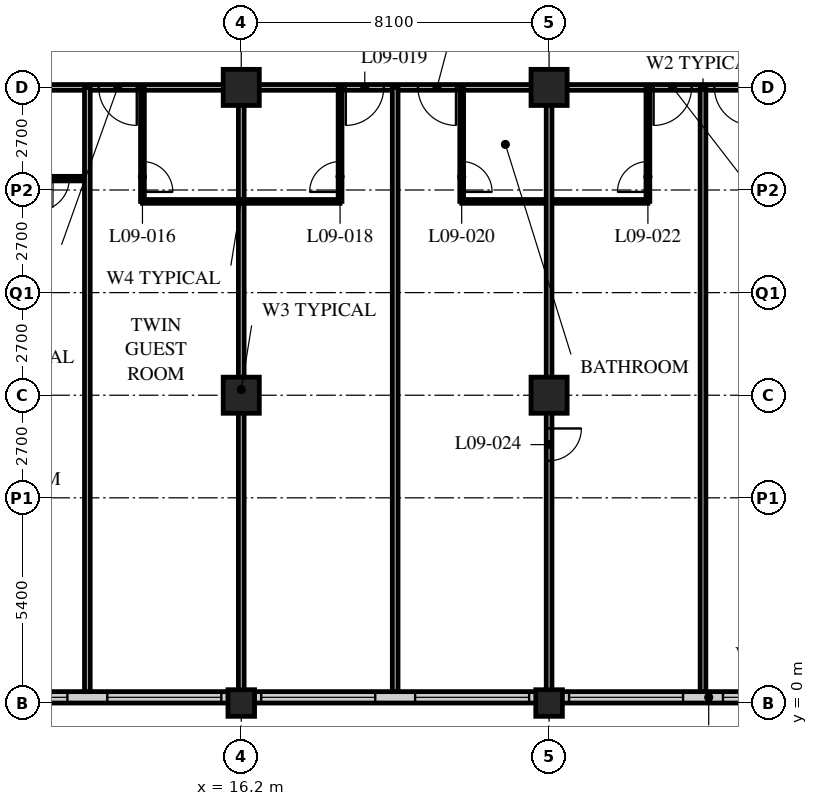
"""IFC4 building model, lengths in metres.
Left out: names, types, materials, properties, quantities, classifications, styles, units other than length and angle.
Written with IfcOpenShell. Run it as: python <this file> out.ifc"""

import sys

from ifc_helpers import new_model, si_unit, direction, frame, frame_2d, origin, origin_2d, place, context, subcontext, project, spatial, rectangle, hollow_rectangle, extrude, element, fill, save


model = new_model("IFC4")
c1 = context("Model", 3, precision=1e-05, world=origin(), true_north=direction((0.0, 1.0)))
c2 = subcontext(c1, "Body", "Model", "MODEL_VIEW")
j1 = project(units=[si_unit("LENGTHUNIT", "METRE"), si_unit("PLANEANGLEUNIT", "RADIAN")], contexts=[c1])
p1 = place(None, origin())
s1 = spatial("IfcSite", under=j1, at=p1, CompositionType="ELEMENT")
p2 = place(p1, origin())
s2 = spatial("IfcBuilding", under=s1, at=p2, CompositionType="ELEMENT")
p3 = place(p2, frame((0.0, 0.0, 43.2)))
s3 = spatial("IfcBuildingStorey", under=s2, at=p3, CompositionType="ELEMENT", Elevation=43.2)
p4 = place(p3, frame((16.2, 0.0, 0.0), z_axis=(0.0, 0.0, 1.0), x_axis=(1.0, 0.0, 0.0)))
e1 = element("IfcColumn", 1, at=p4, inside=s3, PredefinedType="COLUMN", context=c2, shape_type="SweptSolid", body=[
    extrude(hollow_rectangle(XDim=0.7, YDim=0.7, WallThickness=0.06, at=origin_2d()), origin(), (0.0, 0.0, 1.0), 3.4),
])
for number, where, z_axis, x_axis in (
    (2, (16.2, 8.1, 0.0), (0.0, 0.0, 1.0), (1.0, 0.0, 0.0)),
    (3, (16.2, 16.2, 0.0), (0.0, 0.0, 1.0), (1.0, 0.0, 0.0)),
):
    element("IfcColumn", number, at=place(p3, frame(where, z_axis=z_axis, x_axis=x_axis)), inside=s3, PredefinedType="COLUMN", context=c2, shape_type="SweptSolid", body=[
        extrude(hollow_rectangle(XDim=0.95, YDim=0.95, WallThickness=0.095, at=origin_2d()), origin(), (0.0, 0.0, 1.0), 3.4),
    ])
p5 = place(p3, frame((24.3, 0.0, 0.0), z_axis=(0.0, 0.0, 1.0), x_axis=(1.0, 0.0, 0.0)))
e4 = element("IfcColumn", 4, at=p5, inside=s3, PredefinedType="COLUMN", context=c2, shape_type="SweptSolid", body=[
    extrude(hollow_rectangle(XDim=0.7, YDim=0.7, WallThickness=0.06, at=origin_2d()), origin(), (0.0, 0.0, 1.0), 3.4),
])
for number, where, z_axis, x_axis in (
    (5, (24.3, 8.1, 0.0), (0.0, 0.0, 1.0), (1.0, 0.0, 0.0)),
    (6, (24.3, 16.2, 0.0), (0.0, 0.0, 1.0), (1.0, 0.0, 0.0)),
):
    element("IfcColumn", number, at=place(p3, frame(where, z_axis=z_axis, x_axis=x_axis)), inside=s3, PredefinedType="COLUMN", context=c2, shape_type="SweptSolid", body=[
        extrude(hollow_rectangle(XDim=0.95, YDim=0.95, WallThickness=0.095, at=origin_2d()), origin(), (0.0, 0.0, 1.0), 3.4),
    ])
p6 = place(p3, frame((8.4, 0.15, 0.0), z_axis=(0.0, 0.0, 1.0), x_axis=(1.0, 0.0, 0.0)))
e7 = element("IfcWall", 7, at=p6, inside=s3, PredefinedType="SOLIDWALL", context=c2, shape_type="SweptSolid", body=[
    extrude(rectangle(XDim=40.2, YDim=0.3, at=frame_2d((20.1, 0.0))), origin(), (0.0, 0.0, 1.0), 3.19),
])
p7 = place(p6, frame((0.225, 0.0, 0.9)))
e8 = element("IfcOpeningElement", 8, at=p7, cuts=e7, PredefinedType="OPENING", context=c2, shape_type="SweptSolid", body=[
    extrude(rectangle(XDim=3.0, YDim=2.0, at=frame_2d((1.5, 1.0))), frame((0.0, 0.16, 0.0), z_axis=(0.0, -1.0, 0.0), x_axis=(1.0, 0.0, 0.0)), (0.0, 0.0, 1.0), 0.32),
])
p8 = place(p6, frame((4.275, 0.0, 0.9)))
e9 = element("IfcOpeningElement", 9, at=p8, cuts=e7, PredefinedType="OPENING", context=c2, shape_type="SweptSolid", body=[
    extrude(rectangle(XDim=3.0, YDim=2.0, at=frame_2d((1.5, 1.0))), frame((0.0, 0.16, 0.0), z_axis=(0.0, -1.0, 0.0), x_axis=(1.0, 0.0, 0.0)), (0.0, 0.0, 1.0), 0.32),
])
p9 = place(p6, frame((8.325, 0.0, 0.9)))
e10 = element("IfcOpeningElement", 10, at=p9, cuts=e7, PredefinedType="OPENING", context=c2, shape_type="SweptSolid", body=[
    extrude(rectangle(XDim=3.0, YDim=2.0, at=frame_2d((1.5, 1.0))), frame((0.0, 0.16, 0.0), z_axis=(0.0, -1.0, 0.0), x_axis=(1.0, 0.0, 0.0)), (0.0, 0.0, 1.0), 0.32),
])
p10 = place(p6, frame((12.375, 0.0, 0.9)))
e11 = element("IfcOpeningElement", 11, at=p10, cuts=e7, PredefinedType="OPENING", context=c2, shape_type="SweptSolid", body=[
    extrude(rectangle(XDim=3.0, YDim=2.0, at=frame_2d((1.5, 1.0))), frame((0.0, 0.16, 0.0), z_axis=(0.0, -1.0, 0.0), x_axis=(1.0, 0.0, 0.0)), (0.0, 0.0, 1.0), 0.32),
])
p11 = place(p6, frame((16.425, 0.0, 0.9)))
e12 = element("IfcOpeningElement", 12, at=p11, cuts=e7, PredefinedType="OPENING", context=c2, shape_type="SweptSolid", body=[
    extrude(rectangle(XDim=3.0, YDim=2.0, at=frame_2d((1.5, 1.0))), frame((0.0, 0.16, 0.0), z_axis=(0.0, -1.0, 0.0), x_axis=(1.0, 0.0, 0.0)), (0.0, 0.0, 1.0), 0.32),
])
p12 = place(p6, frame((20.475, 0.0, 0.9)))
e13 = element("IfcOpeningElement", 13, at=p12, cuts=e7, PredefinedType="OPENING", context=c2, shape_type="SweptSolid", body=[
    extrude(rectangle(XDim=3.0, YDim=2.0, at=frame_2d((1.5, 1.0))), frame((0.0, 0.16, 0.0), z_axis=(0.0, -1.0, 0.0), x_axis=(1.0, 0.0, 0.0)), (0.0, 0.0, 1.0), 0.32),
])
p13 = place(p6, frame((24.525, 0.0, 0.9)))
e14 = element("IfcOpeningElement", 14, at=p13, cuts=e7, PredefinedType="OPENING", context=c2, shape_type="SweptSolid", body=[
    extrude(rectangle(XDim=3.0, YDim=2.0, at=frame_2d((1.5, 1.0))), frame((0.0, 0.16, 0.0), z_axis=(0.0, -1.0, 0.0), x_axis=(1.0, 0.0, 0.0)), (0.0, 0.0, 1.0), 0.32),
])
p14 = place(p6, frame((28.575, 0.0, 0.9)))
e15 = element("IfcOpeningElement", 15, at=p14, cuts=e7, PredefinedType="OPENING", context=c2, shape_type="SweptSolid", body=[
    extrude(rectangle(XDim=3.0, YDim=2.0, at=frame_2d((1.5, 1.0))), frame((0.0, 0.16, 0.0), z_axis=(0.0, -1.0, 0.0), x_axis=(1.0, 0.0, 0.0)), (0.0, 0.0, 1.0), 0.32),
])
p15 = place(p6, frame((32.625, 0.0, 0.9)))
e16 = element("IfcOpeningElement", 16, at=p15, cuts=e7, PredefinedType="OPENING", context=c2, shape_type="SweptSolid", body=[
    extrude(rectangle(XDim=3.0, YDim=2.0, at=frame_2d((1.5, 1.0))), frame((0.0, 0.16, 0.0), z_axis=(0.0, -1.0, 0.0), x_axis=(1.0, 0.0, 0.0)), (0.0, 0.0, 1.0), 0.32),
])
p16 = place(p6, frame((36.675, 0.0, 0.9)))
e17 = element("IfcOpeningElement", 17, at=p16, cuts=e7, PredefinedType="OPENING", context=c2, shape_type="SweptSolid", body=[
    extrude(rectangle(XDim=3.0, YDim=2.0, at=frame_2d((1.5, 1.0))), frame((0.0, 0.16, 0.0), z_axis=(0.0, -1.0, 0.0), x_axis=(1.0, 0.0, 0.0)), (0.0, 0.0, 1.0), 0.32),
])
p17 = place(p3, frame((8.1, 16.2, 0.0), z_axis=(0.0, 0.0, 1.0), x_axis=(1.0, 0.0, 0.0)))
e18 = element("IfcWall", 18, at=p17, inside=s3, PredefinedType="PARTITIONING", context=c2, shape_type="SweptSolid", body=[
    extrude(rectangle(XDim=40.5, YDim=0.15, at=frame_2d((20.25, 0.0))), origin(), (0.0, 0.0, 1.0), 2.578),
])
p18 = place(p17, frame((4.35, 0.0, 0.0)))
e19 = element("IfcOpeningElement", 19, at=p18, cuts=e18, PredefinedType="OPENING", context=c2, shape_type="SweptSolid", body=[
    extrude(rectangle(XDim=1.0, YDim=2.1, at=frame_2d((0.5, 1.05))), frame((0.0, 0.085, 0.0), z_axis=(0.0, -1.0, 0.0), x_axis=(1.0, 0.0, 0.0)), (0.0, 0.0, 1.0), 0.17),
])
p19 = place(p17, frame((10.85, 0.0, 0.0)))
e20 = element("IfcOpeningElement", 20, at=p19, cuts=e18, PredefinedType="OPENING", context=c2, shape_type="SweptSolid", body=[
    extrude(rectangle(XDim=1.0, YDim=2.1, at=frame_2d((0.5, 1.05))), frame((0.0, 0.085, 0.0), z_axis=(0.0, -1.0, 0.0), x_axis=(1.0, 0.0, 0.0)), (0.0, 0.0, 1.0), 0.17),
])
p20 = place(p17, frame((12.75, 0.0, 0.0)))
e21 = element("IfcOpeningElement", 21, at=p20, cuts=e18, PredefinedType="OPENING", context=c2, shape_type="SweptSolid", body=[
    extrude(rectangle(XDim=1.0, YDim=2.1, at=frame_2d((0.5, 1.05))), frame((0.0, 0.085, 0.0), z_axis=(0.0, -1.0, 0.0), x_axis=(1.0, 0.0, 0.0)), (0.0, 0.0, 1.0), 0.17),
])
p21 = place(p17, frame((18.95, 0.0, 0.0)))
e22 = element("IfcOpeningElement", 22, at=p21, cuts=e18, PredefinedType="OPENING", context=c2, shape_type="SweptSolid", body=[
    extrude(rectangle(XDim=1.0, YDim=2.1, at=frame_2d((0.5, 1.05))), frame((0.0, 0.085, 0.0), z_axis=(0.0, -1.0, 0.0), x_axis=(1.0, 0.0, 0.0)), (0.0, 0.0, 1.0), 0.17),
])
p22 = place(p17, frame((20.55, 0.0, 0.0)))
e23 = element("IfcOpeningElement", 23, at=p22, cuts=e18, PredefinedType="OPENING", context=c2, shape_type="SweptSolid", body=[
    extrude(rectangle(XDim=1.0, YDim=2.1, at=frame_2d((0.5, 1.05))), frame((0.0, 0.085, 0.0), z_axis=(0.0, -1.0, 0.0), x_axis=(1.0, 0.0, 0.0)), (0.0, 0.0, 1.0), 0.17),
])
p23 = place(p17, frame((27.05, 0.0, 0.0)))
e24 = element("IfcOpeningElement", 24, at=p23, cuts=e18, PredefinedType="OPENING", context=c2, shape_type="SweptSolid", body=[
    extrude(rectangle(XDim=1.0, YDim=2.1, at=frame_2d((0.5, 1.05))), frame((0.0, 0.085, 0.0), z_axis=(0.0, -1.0, 0.0), x_axis=(1.0, 0.0, 0.0)), (0.0, 0.0, 1.0), 0.17),
])
p24 = place(p17, frame((28.95, 0.0, 0.0)))
e25 = element("IfcOpeningElement", 25, at=p24, cuts=e18, PredefinedType="OPENING", context=c2, shape_type="SweptSolid", body=[
    extrude(rectangle(XDim=1.0, YDim=2.1, at=frame_2d((0.5, 1.05))), frame((0.0, 0.085, 0.0), z_axis=(0.0, -1.0, 0.0), x_axis=(1.0, 0.0, 0.0)), (0.0, 0.0, 1.0), 0.17),
])
p25 = place(p17, frame((34.85, 0.0, 0.0)))
e26 = element("IfcOpeningElement", 26, at=p25, cuts=e18, PredefinedType="OPENING", context=c2, shape_type="SweptSolid", body=[
    extrude(rectangle(XDim=1.0, YDim=2.1, at=frame_2d((0.5, 1.05))), frame((0.0, 0.085, 0.0), z_axis=(0.0, -1.0, 0.0), x_axis=(1.0, 0.0, 0.0)), (0.0, 0.0, 1.0), 0.17),
])
p26 = place(p17, frame((1.525, 0.0, 0.0)))
e27 = element("IfcOpeningElement", 27, at=p26, cuts=e18, PredefinedType="OPENING", context=c2, shape_type="SweptSolid", body=[
    extrude(rectangle(XDim=1.0, YDim=2.1, at=frame_2d((0.5, 1.05))), frame((0.0, 0.085, 0.0), z_axis=(0.0, -1.0, 0.0), x_axis=(1.0, 0.0, 0.0)), (0.0, 0.0, 1.0), 0.17),
])
p27 = place(p17, frame((37.975, 0.0, 0.0)))
e28 = element("IfcOpeningElement", 28, at=p27, cuts=e18, PredefinedType="OPENING", context=c2, shape_type="SweptSolid", body=[
    extrude(rectangle(XDim=1.0, YDim=2.1, at=frame_2d((0.5, 1.05))), frame((0.0, 0.085, 0.0), z_axis=(0.0, -1.0, 0.0), x_axis=(1.0, 0.0, 0.0)), (0.0, 0.0, 1.0), 0.17),
])
p28 = place(p3, frame((13.6, 13.2, 0.0), z_axis=(0.0, 0.0, 1.0), x_axis=(1.0, 0.0, 0.0)))
e29 = element("IfcWall", 29, at=p28, inside=s3, PredefinedType="PARTITIONING", context=c2, shape_type="SweptSolid", body=[
    extrude(rectangle(XDim=5.2, YDim=0.1, at=frame_2d((2.6, 0.0))), origin(), (0.0, 0.0, 1.0), 3.19),
])
p29 = place(p3, frame((13.6, 16.2, 0.0), z_axis=(0.0, 0.0, 1.0), x_axis=(0.0, -1.0, 0.0)))
e30 = element("IfcWall", 30, at=p29, inside=s3, PredefinedType="PARTITIONING", context=c2, shape_type="SweptSolid", body=[
    extrude(rectangle(XDim=3.0, YDim=0.1, at=frame_2d((1.5, 0.0))), origin(), (0.0, 0.0, 1.0), 3.19),
])
p30 = place(p29, frame((1.95, 0.0, 0.0)))
e31 = element("IfcOpeningElement", 31, at=p30, cuts=e30, PredefinedType="OPENING", context=c2, shape_type="SweptSolid", body=[
    extrude(rectangle(XDim=0.8, YDim=2.1, at=frame_2d((0.4, 1.05))), frame((0.0, 0.06, 0.0), z_axis=(0.0, -1.0, 0.0), x_axis=(1.0, 0.0, 0.0)), (0.0, 0.0, 1.0), 0.12),
])
p31 = place(p3, frame((16.2, 16.2, 0.0), z_axis=(0.0, 0.0, 1.0), x_axis=(0.0, -1.0, 0.0)))
e32 = element("IfcWall", 32, at=p31, inside=s3, PredefinedType="PARTITIONING", context=c2, shape_type="SweptSolid", body=[
    extrude(rectangle(XDim=15.9, YDim=0.15, at=frame_2d((7.95, 0.0))), origin(), (0.0, 0.0, 1.0), 2.578),
])
p32 = place(p3, frame((18.8, 16.2, 0.0), z_axis=(0.0, 0.0, 1.0), x_axis=(0.0, -1.0, 0.0)))
e33 = element("IfcWall", 33, at=p32, inside=s3, PredefinedType="PARTITIONING", context=c2, shape_type="SweptSolid", body=[
    extrude(rectangle(XDim=3.0, YDim=0.1, at=frame_2d((1.5, 0.0))), origin(), (0.0, 0.0, 1.0), 3.19),
])
p33 = place(p32, frame((1.95, 0.0, 0.0)))
e34 = element("IfcOpeningElement", 34, at=p33, cuts=e33, PredefinedType="OPENING", context=c2, shape_type="SweptSolid", body=[
    extrude(rectangle(XDim=0.8, YDim=2.1, at=frame_2d((0.4, 1.05))), frame((0.0, 0.06, 0.0), z_axis=(0.0, -1.0, 0.0), x_axis=(1.0, 0.0, 0.0)), (0.0, 0.0, 1.0), 0.12),
])
p34 = place(p3, frame((20.25, 16.2, 0.0), z_axis=(0.0, 0.0, 1.0), x_axis=(0.0, -1.0, 0.0)))
e35 = element("IfcWall", 35, at=p34, inside=s3, PredefinedType="PARTITIONING", context=c2, shape_type="SweptSolid", body=[
    extrude(rectangle(XDim=15.9, YDim=0.15, at=frame_2d((7.95, 0.0))), origin(), (0.0, 0.0, 1.0), 3.19),
])
p35 = place(p3, frame((22.0, 13.2, 0.0), z_axis=(0.0, 0.0, 1.0), x_axis=(1.0, 0.0, 0.0)))
e36 = element("IfcWall", 36, at=p35, inside=s3, PredefinedType="PARTITIONING", context=c2, shape_type="SweptSolid", body=[
    extrude(rectangle(XDim=4.9, YDim=0.1, at=frame_2d((2.45, 0.0))), origin(), (0.0, 0.0, 1.0), 3.19),
])
p36 = place(p3, frame((22.0, 16.2, 0.0), z_axis=(0.0, 0.0, 1.0), x_axis=(0.0, -1.0, 0.0)))
e37 = element("IfcWall", 37, at=p36, inside=s3, PredefinedType="PARTITIONING", context=c2, shape_type="SweptSolid", body=[
    extrude(rectangle(XDim=3.0, YDim=0.1, at=frame_2d((1.5, 0.0))), origin(), (0.0, 0.0, 1.0), 3.19),
])
p37 = place(p36, frame((1.95, 0.0, 0.0)))
e38 = element("IfcOpeningElement", 38, at=p37, cuts=e37, PredefinedType="OPENING", context=c2, shape_type="SweptSolid", body=[
    extrude(rectangle(XDim=0.8, YDim=2.1, at=frame_2d((0.4, 1.05))), frame((0.0, 0.06, 0.0), z_axis=(0.0, -1.0, 0.0), x_axis=(1.0, 0.0, 0.0)), (0.0, 0.0, 1.0), 0.12),
])
p38 = place(p3, frame((26.9, 16.2, 0.0), z_axis=(0.0, 0.0, 1.0), x_axis=(0.0, -1.0, 0.0)))
e39 = element("IfcWall", 39, at=p38, inside=s3, PredefinedType="PARTITIONING", context=c2, shape_type="SweptSolid", body=[
    extrude(rectangle(XDim=3.0, YDim=0.1, at=frame_2d((1.5, 0.0))), origin(), (0.0, 0.0, 1.0), 3.19),
])
p39 = place(p38, frame((1.95, 0.0, 0.0)))
e40 = element("IfcOpeningElement", 40, at=p39, cuts=e39, PredefinedType="OPENING", context=c2, shape_type="SweptSolid", body=[
    extrude(rectangle(XDim=0.8, YDim=2.1, at=frame_2d((0.4, 1.05))), frame((0.0, 0.06, 0.0), z_axis=(0.0, -1.0, 0.0), x_axis=(1.0, 0.0, 0.0)), (0.0, 0.0, 1.0), 0.12),
])
p40 = place(p3, frame((24.3, 16.2, 0.0), z_axis=(0.0, 0.0, 1.0), x_axis=(0.0, -1.0, 0.0)))
e41 = element("IfcWall", 41, at=p40, inside=s3, PredefinedType="PARTITIONING", context=c2, shape_type="SweptSolid", body=[
    extrude(rectangle(XDim=15.9, YDim=0.15, at=frame_2d((7.95, 0.0))), origin(), (0.0, 0.0, 1.0), 2.578),
])
p41 = place(p40, frame((8.975, 0.0, 0.0)))
e42 = element("IfcOpeningElement", 42, at=p41, cuts=e41, PredefinedType="OPENING", context=c2, shape_type="SweptSolid", body=[
    extrude(rectangle(XDim=0.85, YDim=2.1, at=frame_2d((0.425, 1.05))), frame((0.0, 0.085, 0.0), z_axis=(0.0, -1.0, 0.0), x_axis=(1.0, 0.0, 0.0)), (0.0, 0.0, 1.0), 0.17),
])
p42 = place(p3, frame((28.35, 16.2, 0.0), z_axis=(0.0, 0.0, 1.0), x_axis=(0.0, -1.0, 0.0)))
e43 = element("IfcWall", 43, at=p42, inside=s3, PredefinedType="PARTITIONING", context=c2, shape_type="SweptSolid", body=[
    extrude(rectangle(XDim=15.9, YDim=0.15, at=frame_2d((7.95, 0.0))), origin(), (0.0, 0.0, 1.0), 3.19),
])
p43 = place(p3, frame((4.1, 13.8, 0.0), z_axis=(0.0, 0.0, 1.0), x_axis=(1.0, 0.0, 0.0)))
e44 = element("IfcWall", 44, at=p43, inside=s3, PredefinedType="PARTITIONING", context=c2, shape_type="SweptSolid", body=[
    extrude(rectangle(XDim=8.05, YDim=0.12, at=frame_2d((4.025, 0.0))), origin(), (0.0, 0.0, 1.0), 3.19),
])
p44 = place(p43, frame((6.725, 0.0, 0.0)))
e45 = element("IfcOpeningElement", 45, at=p44, cuts=e44, PredefinedType="OPENING", context=c2, shape_type="SweptSolid", body=[
    extrude(rectangle(XDim=0.85, YDim=2.1, at=frame_2d((0.425, 1.05))), frame((0.0, 0.07, 0.0), z_axis=(0.0, -1.0, 0.0), x_axis=(1.0, 0.0, 0.0)), (0.0, 0.0, 1.0), 0.14),
])
p45 = place(p43, frame((2.875, 0.0, 0.0)))
e46 = element("IfcOpeningElement", 46, at=p45, cuts=e44, PredefinedType="OPENING", context=c2, shape_type="SweptSolid", body=[
    extrude(rectangle(XDim=0.85, YDim=2.1, at=frame_2d((0.425, 1.05))), frame((0.0, 0.07, 0.0), z_axis=(0.0, -1.0, 0.0), x_axis=(1.0, 0.0, 0.0)), (0.0, 0.0, 1.0), 0.14),
])
p46 = place(p3, frame((12.15, 16.2, 0.0), z_axis=(0.0, 0.0, 1.0), x_axis=(0.0, -1.0, 0.0)))
e47 = element("IfcWall", 47, at=p46, inside=s3, PredefinedType="PARTITIONING", context=c2, shape_type="SweptSolid", body=[
    extrude(rectangle(XDim=15.9, YDim=0.15, at=frame_2d((7.95, 0.0))), origin(), (0.0, 0.0, 1.0), 3.19),
])
p47 = place(p7, origin())
e48 = element("IfcWindow", 48, at=p47, inside=s3, PartitioningType="SINGLE_PANEL", PredefinedType="WINDOW", context=c2, shape_type="SweptSolid", body=[
    extrude(rectangle(XDim=3.0, YDim=2.0, at=frame_2d((1.5, 1.0))), frame((0.0, 0.03, 0.0), z_axis=(0.0, -1.0, 0.0), x_axis=(1.0, 0.0, 0.0)), (0.0, 0.0, 1.0), 0.06),
])
fill(e8, e48)
p48 = place(p8, origin())
e49 = element("IfcWindow", 49, at=p48, inside=s3, PartitioningType="SINGLE_PANEL", PredefinedType="WINDOW", context=c2, shape_type="SweptSolid", body=[
    extrude(rectangle(XDim=3.0, YDim=2.0, at=frame_2d((1.5, 1.0))), frame((0.0, 0.03, 0.0), z_axis=(0.0, -1.0, 0.0), x_axis=(1.0, 0.0, 0.0)), (0.0, 0.0, 1.0), 0.06),
])
fill(e9, e49)
p49 = place(p9, origin())
e50 = element("IfcWindow", 50, at=p49, inside=s3, PartitioningType="SINGLE_PANEL", PredefinedType="WINDOW", context=c2, shape_type="SweptSolid", body=[
    extrude(rectangle(XDim=3.0, YDim=2.0, at=frame_2d((1.5, 1.0))), frame((0.0, 0.03, 0.0), z_axis=(0.0, -1.0, 0.0), x_axis=(1.0, 0.0, 0.0)), (0.0, 0.0, 1.0), 0.06),
])
fill(e10, e50)
p50 = place(p10, origin())
e51 = element("IfcWindow", 51, at=p50, inside=s3, PartitioningType="SINGLE_PANEL", PredefinedType="WINDOW", context=c2, shape_type="SweptSolid", body=[
    extrude(rectangle(XDim=3.0, YDim=2.0, at=frame_2d((1.5, 1.0))), frame((0.0, 0.03, 0.0), z_axis=(0.0, -1.0, 0.0), x_axis=(1.0, 0.0, 0.0)), (0.0, 0.0, 1.0), 0.06),
])
fill(e11, e51)
p51 = place(p11, origin())
e52 = element("IfcWindow", 52, at=p51, inside=s3, PartitioningType="SINGLE_PANEL", PredefinedType="WINDOW", context=c2, shape_type="SweptSolid", body=[
    extrude(rectangle(XDim=3.0, YDim=2.0, at=frame_2d((1.5, 1.0))), frame((0.0, 0.03, 0.0), z_axis=(0.0, -1.0, 0.0), x_axis=(1.0, 0.0, 0.0)), (0.0, 0.0, 1.0), 0.06),
])
fill(e12, e52)
p52 = place(p12, origin())
e53 = element("IfcWindow", 53, at=p52, inside=s3, PartitioningType="SINGLE_PANEL", PredefinedType="WINDOW", context=c2, shape_type="SweptSolid", body=[
    extrude(rectangle(XDim=3.0, YDim=2.0, at=frame_2d((1.5, 1.0))), frame((0.0, 0.03, 0.0), z_axis=(0.0, -1.0, 0.0), x_axis=(1.0, 0.0, 0.0)), (0.0, 0.0, 1.0), 0.06),
])
fill(e13, e53)
p53 = place(p30, origin())
e54 = element("IfcDoor", 54, at=p53, inside=s3, OperationType="SINGLE_SWING_RIGHT", PredefinedType="DOOR", context=c2, shape_type="SweptSolid", body=[
    extrude(rectangle(XDim=0.8, YDim=2.1, at=frame_2d((0.4, 1.05))), frame((0.0, 0.025, 0.0), z_axis=(0.0, -1.0, 0.0), x_axis=(1.0, 0.0, 0.0)), (0.0, 0.0, 1.0), 0.05),
])
fill(e31, e54)
p54 = place(p18, origin())
e55 = element("IfcDoor", 55, at=p54, inside=s3, OperationType="SINGLE_SWING_LEFT", PredefinedType="DOOR", context=c2, shape_type="SweptSolid", body=[
    extrude(rectangle(XDim=1.0, YDim=2.1, at=frame_2d((0.5, 1.05))), frame((0.0, 0.025, 0.0), z_axis=(0.0, -1.0, 0.0), x_axis=(1.0, 0.0, 0.0)), (0.0, 0.0, 1.0), 0.05),
])
fill(e19, e55)
p55 = place(p33, origin())
e56 = element("IfcDoor", 56, at=p55, inside=s3, OperationType="SINGLE_SWING_LEFT", PredefinedType="DOOR", context=c2, shape_type="SweptSolid", body=[
    extrude(rectangle(XDim=0.8, YDim=2.1, at=frame_2d((0.4, 1.05))), frame((0.0, 0.025, 0.0), z_axis=(0.0, -1.0, 0.0), x_axis=(1.0, 0.0, 0.0)), (0.0, 0.0, 1.0), 0.05),
])
fill(e34, e56)
p56 = place(p19, origin())
e57 = element("IfcDoor", 57, at=p56, inside=s3, OperationType="SINGLE_SWING_RIGHT", PredefinedType="DOOR", context=c2, shape_type="SweptSolid", body=[
    extrude(rectangle(XDim=1.0, YDim=2.1, at=frame_2d((0.5, 1.05))), frame((0.0, 0.025, 0.0), z_axis=(0.0, -1.0, 0.0), x_axis=(1.0, 0.0, 0.0)), (0.0, 0.0, 1.0), 0.05),
])
fill(e20, e57)
p57 = place(p37, origin())
e58 = element("IfcDoor", 58, at=p57, inside=s3, OperationType="SINGLE_SWING_RIGHT", PredefinedType="DOOR", context=c2, shape_type="SweptSolid", body=[
    extrude(rectangle(XDim=0.8, YDim=2.1, at=frame_2d((0.4, 1.05))), frame((0.0, 0.025, 0.0), z_axis=(0.0, -1.0, 0.0), x_axis=(1.0, 0.0, 0.0)), (0.0, 0.0, 1.0), 0.05),
])
fill(e38, e58)
p58 = place(p20, origin())
e59 = element("IfcDoor", 59, at=p58, inside=s3, OperationType="SINGLE_SWING_LEFT", PredefinedType="DOOR", context=c2, shape_type="SweptSolid", body=[
    extrude(rectangle(XDim=1.0, YDim=2.1, at=frame_2d((0.5, 1.05))), frame((0.0, 0.025, 0.0), z_axis=(0.0, -1.0, 0.0), x_axis=(1.0, 0.0, 0.0)), (0.0, 0.0, 1.0), 0.05),
])
fill(e21, e59)
p59 = place(p39, origin())
e60 = element("IfcDoor", 60, at=p59, inside=s3, OperationType="SINGLE_SWING_LEFT", PredefinedType="DOOR", context=c2, shape_type="SweptSolid", body=[
    extrude(rectangle(XDim=0.8, YDim=2.1, at=frame_2d((0.4, 1.05))), frame((0.0, 0.025, 0.0), z_axis=(0.0, -1.0, 0.0), x_axis=(1.0, 0.0, 0.0)), (0.0, 0.0, 1.0), 0.05),
])
fill(e40, e60)
p60 = place(p21, origin())
e61 = element("IfcDoor", 61, at=p60, inside=s3, OperationType="SINGLE_SWING_RIGHT", PredefinedType="DOOR", context=c2, shape_type="SweptSolid", body=[
    extrude(rectangle(XDim=1.0, YDim=2.1, at=frame_2d((0.5, 1.05))), frame((0.0, 0.025, 0.0), z_axis=(0.0, -1.0, 0.0), x_axis=(1.0, 0.0, 0.0)), (0.0, 0.0, 1.0), 0.05),
])
fill(e22, e61)
p61 = place(p41, origin())
e62 = element("IfcDoor", 62, at=p61, inside=s3, OperationType="SINGLE_SWING_LEFT", PredefinedType="DOOR", context=c2, shape_type="SweptSolid", body=[
    extrude(rectangle(XDim=0.85, YDim=2.1, at=frame_2d((0.425, 1.05))), frame((0.0, 0.025, 0.0), z_axis=(0.0, -1.0, 0.0), x_axis=(1.0, 0.0, 0.0)), (0.0, 0.0, 1.0), 0.05),
])
fill(e42, e62)
p62 = place(p22, origin())
e63 = element("IfcDoor", 63, at=p62, inside=s3, OperationType="SINGLE_SWING_LEFT", PredefinedType="DOOR", context=c2, shape_type="SweptSolid", body=[
    extrude(rectangle(XDim=1.0, YDim=2.1, at=frame_2d((0.5, 1.05))), frame((0.0, 0.025, 0.0), z_axis=(0.0, -1.0, 0.0), x_axis=(1.0, 0.0, 0.0)), (0.0, 0.0, 1.0), 0.05),
])
fill(e23, e63)
p63 = place(p44, origin())
e64 = element("IfcDoor", 64, at=p63, inside=s3, OperationType="SINGLE_SWING_RIGHT", PredefinedType="DOOR", context=c2, shape_type="SweptSolid", body=[
    extrude(rectangle(XDim=0.85, YDim=2.1, at=frame_2d((0.425, 1.05))), frame((0.0, 0.025, 0.0), z_axis=(0.0, -1.0, 0.0), x_axis=(1.0, 0.0, 0.0)), (0.0, 0.0, 1.0), 0.05),
])
fill(e45, e64)
save(model, sys.argv[1])
